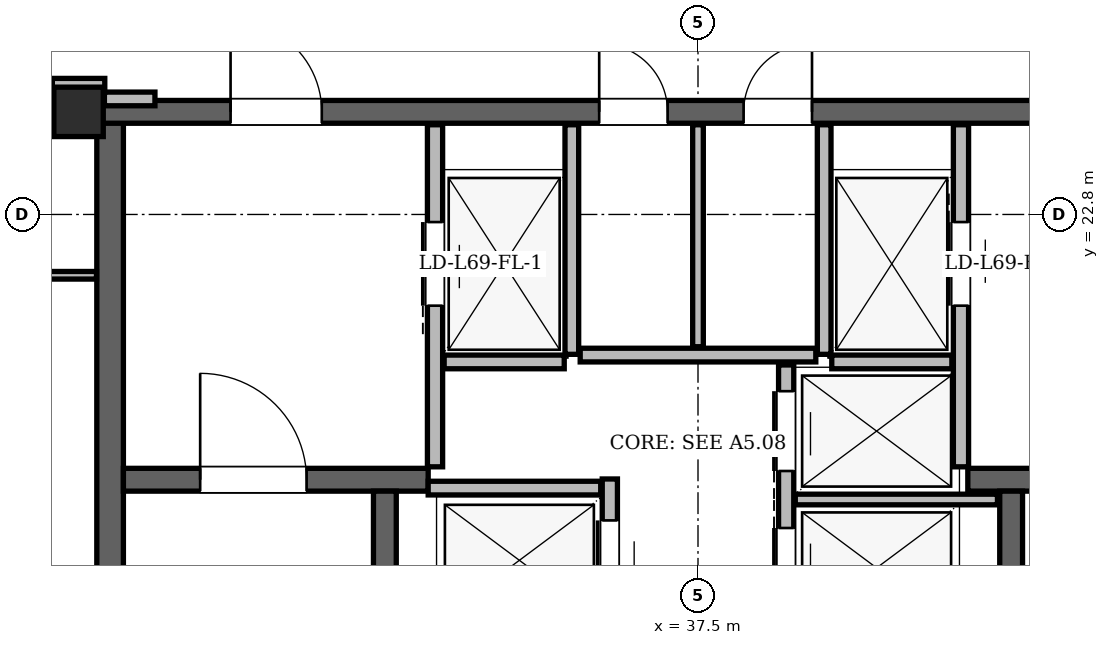
"""IFC4 building model, lengths in metres.
Left out: names, types, materials, properties, quantities, classifications, styles, units other than length and angle.
Written with IfcOpenShell. Run it as: python <this file> out.ifc"""

import sys

from ifc_helpers import new_model, si_unit, direction, frame, frame_2d, origin, origin_2d, place, context, subcontext, project, spatial, rectangle, hollow_rectangle, extrude, element, fill, save


model = new_model("IFC4")
c1 = context("Model", 3, precision=1e-05, world=origin(), true_north=direction((0.0, 1.0)))
c2 = subcontext(c1, "Body", "Model", "MODEL_VIEW")
j1 = project(units=[si_unit("LENGTHUNIT", "METRE"), si_unit("PLANEANGLEUNIT", "RADIAN")], contexts=[c1])
p1 = place(None, origin())
s1 = spatial("IfcSite", under=j1, at=p1, CompositionType="ELEMENT")
p2 = place(p1, origin())
s2 = spatial("IfcBuilding", under=s1, at=p2, CompositionType="ELEMENT")
p3 = place(p2, frame((0.0, 0.0, 261.6)))
s3 = spatial("IfcBuildingStorey", under=s2, at=p3, CompositionType="ELEMENT", Elevation=261.6)
p4 = place(p3, frame((29.35, 24.15, 0.0), z_axis=(0.0, 0.0, 1.0), x_axis=(1.0, 0.0, 0.0)))
e1 = element("IfcColumn", 1, at=p4, inside=s3, PredefinedType="COLUMN", context=c2, shape_type="SweptSolid", body=[
    extrude(hollow_rectangle(XDim=0.65, YDim=0.65, WallThickness=0.05, at=origin_2d()), origin(), (0.0, 0.0, 1.0), 3.9),
])
p5 = place(p3, frame((29.765, 11.0, 0.0), z_axis=(0.0, 0.0, 1.0), x_axis=(0.0, 1.0, 0.0)))
e2 = element("IfcWall", 2, at=p5, inside=s3, PredefinedType="SHEAR", context=c2, shape_type="SweptSolid", body=[
    extrude(rectangle(XDim=13.3, YDim=0.35, at=frame_2d((6.65, 0.0))), origin(), (0.0, 0.0, 1.0), 3.68),
])
p6 = place(p3, frame((29.65, 24.15, 0.0), z_axis=(0.0, 0.0, 1.0), x_axis=(1.0, 0.0, 0.0)))
e3 = element("IfcWall", 3, at=p6, inside=s3, PredefinedType="SHEAR", context=c2, shape_type="SweptSolid", body=[
    extrude(rectangle(XDim=15.7, YDim=0.3, at=frame_2d((7.85, 0.0))), origin(), (0.0, 0.0, 1.0), 3.68),
])
p7 = place(p6, frame((1.7, 0.0, 0.0)))
e4 = element("IfcOpeningElement", 4, at=p7, cuts=e3, PredefinedType="OPENING", context=c2, shape_type="SweptSolid", body=[
    extrude(rectangle(XDim=1.2, YDim=2.2, at=frame_2d((0.6, 1.1))), frame((0.0, 0.15, 0.0), z_axis=(0.0, -1.0, 0.0), x_axis=(1.0, 0.0, 0.0)), (0.0, 0.0, 1.0), 0.3),
])
p8 = place(p6, frame((12.8, 0.0, 0.0)))
e5 = element("IfcOpeningElement", 5, at=p8, cuts=e3, PredefinedType="OPENING", context=c2, shape_type="SweptSolid", body=[
    extrude(rectangle(XDim=1.2, YDim=2.2, at=frame_2d((0.6, 1.1))), frame((0.0, 0.15, 0.0), z_axis=(0.0, -1.0, 0.0), x_axis=(1.0, 0.0, 0.0)), (0.0, 0.0, 1.0), 0.3),
])
p9 = place(p6, frame((6.55, 0.0, 0.0)))
e6 = element("IfcOpeningElement", 6, at=p9, cuts=e3, PredefinedType="OPENING", context=c2, shape_type="SweptSolid", body=[
    extrude(rectangle(XDim=0.9, YDim=2.05, at=frame_2d((0.45, 1.025))), frame((0.0, 0.15, 0.0), z_axis=(0.0, -1.0, 0.0), x_axis=(1.0, 0.0, 0.0)), (0.0, 0.0, 1.0), 0.3),
])
p10 = place(p6, frame((8.45, 0.0, 0.0)))
e7 = element("IfcOpeningElement", 7, at=p10, cuts=e3, PredefinedType="OPENING", context=c2, shape_type="SweptSolid", body=[
    extrude(rectangle(XDim=0.9, YDim=2.05, at=frame_2d((0.45, 1.025))), frame((0.0, 0.15, 0.0), z_axis=(0.0, -1.0, 0.0), x_axis=(1.0, 0.0, 0.0)), (0.0, 0.0, 1.0), 0.3),
])
p11 = place(p3, frame((29.94, 19.31, 0.0), z_axis=(0.0, 0.0, 1.0), x_axis=(1.0, 0.0, 0.0)))
e8 = element("IfcWall", 8, at=p11, inside=s3, PredefinedType="SHEAR", context=c2, shape_type="SweptSolid", body=[
    extrude(rectangle(XDim=4.01, YDim=0.3, at=frame_2d((2.005, 0.0))), origin(), (0.0, 0.0, 1.0), 3.68),
])
p12 = place(p11, frame((1.01, 0.0, 0.0)))
e9 = element("IfcOpeningElement", 9, at=p12, cuts=e8, PredefinedType="OPENING", context=c2, shape_type="SweptSolid", body=[
    extrude(rectangle(XDim=1.4, YDim=2.2, at=frame_2d((0.7, 1.1))), frame((0.0, 0.15, 0.0), z_axis=(0.0, -1.0, 0.0), x_axis=(1.0, 0.0, 0.0)), (0.0, 0.0, 1.0), 0.3),
])
p13 = place(p3, frame((41.05, 19.31, 0.0), z_axis=(0.0, 0.0, 1.0), x_axis=(1.0, 0.0, 0.0)))
e10 = element("IfcWall", 10, at=p13, inside=s3, PredefinedType="SHEAR", context=c2, shape_type="SweptSolid", body=[
    extrude(rectangle(XDim=4.01, YDim=0.3, at=frame_2d((2.005, 0.0))), origin(), (0.0, 0.0, 1.0), 3.68),
])
p14 = place(p13, frame((1.6, 0.0, 0.0)))
e11 = element("IfcOpeningElement", 11, at=p14, cuts=e10, PredefinedType="OPENING", context=c2, shape_type="SweptSolid", body=[
    extrude(rectangle(XDim=1.4, YDim=2.2, at=frame_2d((0.7, 1.1))), frame((0.0, 0.15, 0.0), z_axis=(0.0, -1.0, 0.0), x_axis=(1.0, 0.0, 0.0)), (0.0, 0.0, 1.0), 0.3),
])
for number, where, z_axis, x_axis in (
    (12, (33.38, 11.54, 0.0), (0.0, 0.0, 1.0), (0.0, 1.0, 0.0)),
    (13, (41.62, 11.54, 0.0), (0.0, 0.0, 1.0), (0.0, 1.0, 0.0)),
):
    element("IfcWall", number, at=place(p3, frame(where, z_axis=z_axis, x_axis=x_axis)), inside=s3, PredefinedType="SHEAR", context=c2, shape_type="SweptSolid", body=[
        extrude(rectangle(XDim=7.62, YDim=0.3, at=frame_2d((3.81, 0.0))), origin(), (0.0, 0.0, 1.0), 3.68),
    ])
p15 = place(p3, frame((58.652, 10.835, 0.0), z_axis=(0.0, 0.0, 1.0), x_axis=(-0.500002906693, 0.866023725598, 0.0)))
e14 = element("IfcWall", 14, at=p15, inside=s3, PredefinedType="SOLIDWALL", context=c2, shape_type="SweptSolid", body=[
    extrude(rectangle(XDim=37.2, YDim=0.29, at=frame_2d((18.6, 0.0))), origin(), (0.0, 0.0, 1.0), 3.058),
])
p16 = place(p15, frame((6.774, 0.0, 0.0)))
e15 = element("IfcOpeningElement", 15, at=p16, cuts=e14, PredefinedType="OPENING", context=c2, shape_type="SweptSolid", body=[
    extrude(rectangle(XDim=1.5, YDim=2.2, at=frame_2d((0.75, 1.1))), frame((0.0, 0.145, 0.0), z_axis=(0.0, -1.0, 0.0), x_axis=(1.0, 0.0, 0.0)), (0.0, 0.0, 1.0), 0.29),
])
p17 = place(p15, frame((32.061, 0.0, 0.0)))
e16 = element("IfcOpeningElement", 16, at=p17, cuts=e14, PredefinedType="OPENING", context=c2, shape_type="SweptSolid", body=[
    extrude(rectangle(XDim=1.5, YDim=2.2, at=frame_2d((0.75, 1.1))), frame((0.0, 0.145, 0.0), z_axis=(0.0, -1.0, 0.0), x_axis=(1.0, 0.0, 0.0)), (0.0, 0.0, 1.0), 0.29),
])
p18 = place(p15, frame((12.689, 0.0, 0.85)))
e17 = element("IfcOpeningElement", 17, at=p18, cuts=e14, PredefinedType="OPENING", context=c2, shape_type="SweptSolid", body=[
    extrude(rectangle(XDim=1.6, YDim=1.7, at=frame_2d((0.8, 0.85))), frame((0.0, 0.145, 0.0), z_axis=(0.0, -1.0, 0.0), x_axis=(1.0, 0.0, 0.0)), (0.0, 0.0, 1.0), 0.29),
])
p19 = place(p15, frame((16.599, 0.0, 0.85)))
e18 = element("IfcOpeningElement", 18, at=p19, cuts=e14, PredefinedType="OPENING", context=c2, shape_type="SweptSolid", body=[
    extrude(rectangle(XDim=3.0, YDim=2.098, at=frame_2d((1.5, 1.049))), frame((0.0, 0.145, 0.0), z_axis=(0.0, -1.0, 0.0), x_axis=(1.0, 0.0, 0.0)), (0.0, 0.0, 1.0), 0.29),
])
p20 = place(p15, frame((1.24, 0.0, 0.85)))
e19 = element("IfcOpeningElement", 19, at=p20, cuts=e14, PredefinedType="OPENING", context=c2, shape_type="SweptSolid", body=[
    extrude(rectangle(XDim=1.2, YDim=1.48, at=frame_2d((0.6, 0.74))), frame((0.0, 0.145, 0.0), z_axis=(0.0, -1.0, 0.0), x_axis=(1.0, 0.0, 0.0)), (0.0, 0.0, 1.0), 0.29),
])
p21 = place(p15, frame((3.566, 0.0, 0.85)))
e20 = element("IfcOpeningElement", 20, at=p21, cuts=e14, PredefinedType="OPENING", context=c2, shape_type="SweptSolid", body=[
    extrude(rectangle(XDim=1.2, YDim=1.48, at=frame_2d((0.6, 0.74))), frame((0.0, 0.145, 0.0), z_axis=(0.0, -1.0, 0.0), x_axis=(1.0, 0.0, 0.0)), (0.0, 0.0, 1.0), 0.29),
])
p22 = place(p15, frame((22.917, 0.0, 0.85)))
e21 = element("IfcOpeningElement", 21, at=p22, cuts=e14, PredefinedType="OPENING", context=c2, shape_type="SweptSolid", body=[
    extrude(rectangle(XDim=1.6, YDim=1.7, at=frame_2d((0.8, 0.85))), frame((0.0, 0.145, 0.0), z_axis=(0.0, -1.0, 0.0), x_axis=(1.0, 0.0, 0.0)), (0.0, 0.0, 1.0), 0.29),
])
p23 = place(p15, frame((27.025, 0.0, 0.85)))
e22 = element("IfcOpeningElement", 22, at=p23, cuts=e14, PredefinedType="OPENING", context=c2, shape_type="SweptSolid", body=[
    extrude(rectangle(XDim=3.0, YDim=2.098, at=frame_2d((1.5, 1.049))), frame((0.0, 0.145, 0.0), z_axis=(0.0, -1.0, 0.0), x_axis=(1.0, 0.0, 0.0)), (0.0, 0.0, 1.0), 0.29),
])
p24 = place(p15, frame((34.508, 0.0, 0.85)))
e23 = element("IfcOpeningElement", 23, at=p24, cuts=e14, PredefinedType="OPENING", context=c2, shape_type="SweptSolid", body=[
    extrude(rectangle(XDim=1.2, YDim=1.48, at=frame_2d((0.6, 0.74))), frame((0.0, 0.145, 0.0), z_axis=(0.0, -1.0, 0.0), x_axis=(1.0, 0.0, 0.0)), (0.0, 0.0, 1.0), 0.29),
])
p25 = place(p3, frame((34.948, 43.051, 0.0), z_axis=(0.0, 0.0, 1.0), x_axis=(-0.500002906693, -0.866023725598, 0.0)))
e24 = element("IfcWall", 24, at=p25, inside=s3, PredefinedType="SOLIDWALL", context=c2, shape_type="SweptSolid", body=[
    extrude(rectangle(XDim=37.2, YDim=0.29, at=frame_2d((18.6, 0.0))), origin(), (0.0, 0.0, 1.0), 3.058),
])
p26 = place(p25, frame((8.034, 0.0, 0.0)))
e25 = element("IfcOpeningElement", 25, at=p26, cuts=e24, PredefinedType="OPENING", context=c2, shape_type="SweptSolid", body=[
    extrude(rectangle(XDim=1.5, YDim=2.2, at=frame_2d((0.75, 1.1))), frame((0.0, 0.145, 0.0), z_axis=(0.0, -1.0, 0.0), x_axis=(1.0, 0.0, 0.0)), (0.0, 0.0, 1.0), 0.29),
])
p27 = place(p25, frame((32.061, 0.0, 0.0)))
e26 = element("IfcOpeningElement", 26, at=p27, cuts=e24, PredefinedType="OPENING", context=c2, shape_type="SweptSolid", body=[
    extrude(rectangle(XDim=1.5, YDim=2.2, at=frame_2d((0.75, 1.1))), frame((0.0, 0.145, 0.0), z_axis=(0.0, -1.0, 0.0), x_axis=(1.0, 0.0, 0.0)), (0.0, 0.0, 1.0), 0.29),
])
p28 = place(p25, frame((35.104, 0.0, 0.85)))
e27 = element("IfcOpeningElement", 27, at=p28, cuts=e24, PredefinedType="OPENING", context=c2, shape_type="SweptSolid", body=[
    extrude(rectangle(XDim=1.2, YDim=1.48, at=frame_2d((0.6, 0.74))), frame((0.0, 0.145, 0.0), z_axis=(0.0, -1.0, 0.0), x_axis=(1.0, 0.0, 0.0)), (0.0, 0.0, 1.0), 0.29),
])
p29 = place(p25, frame((12.597, 0.0, 0.85)))
e28 = element("IfcOpeningElement", 28, at=p29, cuts=e24, PredefinedType="OPENING", context=c2, shape_type="SweptSolid", body=[
    extrude(rectangle(XDim=2.0, YDim=1.8, at=frame_2d((1.0, 0.9))), frame((0.0, 0.145, 0.0), z_axis=(0.0, -1.0, 0.0), x_axis=(1.0, 0.0, 0.0)), (0.0, 0.0, 1.0), 0.29),
])
p30 = place(p25, frame((20.995, 0.0, 0.85)))
e29 = element("IfcOpeningElement", 29, at=p30, cuts=e24, PredefinedType="OPENING", context=c2, shape_type="SweptSolid", body=[
    extrude(rectangle(XDim=1.4, YDim=1.6, at=frame_2d((0.7, 0.8))), frame((0.0, 0.145, 0.0), z_axis=(0.0, -1.0, 0.0), x_axis=(1.0, 0.0, 0.0)), (0.0, 0.0, 1.0), 0.29),
])
p31 = place(p25, frame((27.454, 0.0, 0.85)))
e30 = element("IfcOpeningElement", 30, at=p31, cuts=e24, PredefinedType="OPENING", context=c2, shape_type="SweptSolid", body=[
    extrude(rectangle(XDim=1.2, YDim=1.48, at=frame_2d((0.6, 0.74))), frame((0.0, 0.145, 0.0), z_axis=(0.0, -1.0, 0.0), x_axis=(1.0, 0.0, 0.0)), (0.0, 0.0, 1.0), 0.29),
])
p32 = place(p25, frame((2.415, 0.0, 0.85)))
e31 = element("IfcOpeningElement", 31, at=p32, cuts=e24, PredefinedType="OPENING", context=c2, shape_type="SweptSolid", body=[
    extrude(rectangle(XDim=2.6, YDim=1.95, at=frame_2d((1.3, 0.975))), frame((0.0, 0.145, 0.0), z_axis=(0.0, -1.0, 0.0), x_axis=(1.0, 0.0, 0.0)), (0.0, 0.0, 1.0), 0.29),
])
p33 = place(p3, frame((34.04, 19.48, 0.0), z_axis=(0.0, 0.0, 1.0), x_axis=(0.0, 1.0, 0.0)))
e32 = element("IfcWall", 32, at=p33, inside=s3, PredefinedType="PARTITIONING", context=c2, shape_type="SweptSolid", body=[
    extrude(rectangle(XDim=4.5, YDim=0.2, at=frame_2d((2.25, 0.0))), origin(), (0.0, 0.0, 1.0), 3.68),
])
p34 = place(p33, frame((2.12, 0.0, 0.0)))
e33 = element("IfcOpeningElement", 33, at=p34, cuts=e32, PredefinedType="OPENING", context=c2, shape_type="SweptSolid", body=[
    extrude(rectangle(XDim=1.1, YDim=2.2, at=frame_2d((0.55, 1.1))), frame((0.0, 0.1, 0.0), z_axis=(0.0, -1.0, 0.0), x_axis=(1.0, 0.0, 0.0)), (0.0, 0.0, 1.0), 0.2),
])
p35 = place(p3, frame((35.84, 20.96, 0.0), z_axis=(0.0, 0.0, 1.0), x_axis=(0.0, 1.0, 0.0)))
e34 = element("IfcWall", 34, at=p35, inside=s3, PredefinedType="PARTITIONING", context=c2, shape_type="SweptSolid", body=[
    extrude(rectangle(XDim=3.02, YDim=0.18, at=frame_2d((1.51, 0.0))), origin(), (0.0, 0.0, 1.0), 3.68),
])
p36 = place(p3, frame((34.16, 20.86, 0.0), z_axis=(0.0, 0.0, 1.0), x_axis=(1.0, 0.0, 0.0)))
e35 = element("IfcWall", 35, at=p36, inside=s3, PredefinedType="PARTITIONING", context=c2, shape_type="SweptSolid", body=[
    extrude(rectangle(XDim=1.58, YDim=0.18, at=frame_2d((0.79, 0.0))), origin(), (0.0, 0.0, 1.0), 3.68),
])
p37 = place(p3, frame((40.96, 19.48, 0.0), z_axis=(0.0, 0.0, 1.0), x_axis=(0.0, 1.0, 0.0)))
e36 = element("IfcWall", 36, at=p37, inside=s3, PredefinedType="PARTITIONING", context=c2, shape_type="SweptSolid", body=[
    extrude(rectangle(XDim=4.5, YDim=0.2, at=frame_2d((2.25, 0.0))), origin(), (0.0, 0.0, 1.0), 3.68),
])
p38 = place(p37, frame((2.12, 0.0, 0.0)))
e37 = element("IfcOpeningElement", 37, at=p38, cuts=e36, PredefinedType="OPENING", context=c2, shape_type="SweptSolid", body=[
    extrude(rectangle(XDim=1.1, YDim=2.2, at=frame_2d((0.55, 1.1))), frame((0.0, 0.1, 0.0), z_axis=(0.0, -1.0, 0.0), x_axis=(1.0, 0.0, 0.0)), (0.0, 0.0, 1.0), 0.2),
])
p39 = place(p3, frame((39.16, 20.96, 0.0), z_axis=(0.0, 0.0, 1.0), x_axis=(0.0, 1.0, 0.0)))
e38 = element("IfcWall", 38, at=p39, inside=s3, PredefinedType="PARTITIONING", context=c2, shape_type="SweptSolid", body=[
    extrude(rectangle(XDim=3.02, YDim=0.18, at=frame_2d((1.51, 0.0))), origin(), (0.0, 0.0, 1.0), 3.68),
])
p40 = place(p3, frame((39.26, 20.86, 0.0), z_axis=(0.0, 0.0, 1.0), x_axis=(1.0, 0.0, 0.0)))
e39 = element("IfcWall", 39, at=p40, inside=s3, PredefinedType="PARTITIONING", context=c2, shape_type="SweptSolid", body=[
    extrude(rectangle(XDim=1.58, YDim=0.18, at=frame_2d((0.79, 0.0))), origin(), (0.0, 0.0, 1.0), 3.68),
])
p41 = place(p3, frame((36.34, 17.25, 0.0), z_axis=(0.0, 0.0, 1.0), x_axis=(0.0, 1.0, 0.0)))
e40 = element("IfcWall", 40, at=p41, inside=s3, PredefinedType="PARTITIONING", context=c2, shape_type="SweptSolid", body=[
    extrude(rectangle(XDim=2.07, YDim=0.2, at=frame_2d((1.035, 0.0))), origin(), (0.0, 0.0, 1.0), 3.68),
])
p42 = place(p41, frame((0.475, 0.0, 0.0)))
e41 = element("IfcOpeningElement", 41, at=p42, cuts=e40, PredefinedType="OPENING", context=c2, shape_type="SweptSolid", body=[
    extrude(rectangle(XDim=1.05, YDim=2.15, at=frame_2d((0.525, 1.075))), frame((0.0, 0.1, 0.0), z_axis=(0.0, -1.0, 0.0), x_axis=(1.0, 0.0, 0.0)), (0.0, 0.0, 1.0), 0.2),
])
p43 = place(p3, frame((33.95, 19.2, 0.0), z_axis=(0.0, 0.0, 1.0), x_axis=(1.0, 0.0, 0.0)))
e42 = element("IfcWall", 42, at=p43, inside=s3, PredefinedType="PARTITIONING", context=c2, shape_type="SweptSolid", body=[
    extrude(rectangle(XDim=2.27, YDim=0.18, at=frame_2d((1.135, 0.0))), origin(), (0.0, 0.0, 1.0), 3.68),
])
p44 = place(p3, frame((38.66, 17.2, 0.0), z_axis=(0.0, 0.0, 1.0), x_axis=(0.0, 1.0, 0.0)))
e43 = element("IfcWall", 43, at=p44, inside=s3, PredefinedType="PARTITIONING", context=c2, shape_type="SweptSolid", body=[
    extrude(rectangle(XDim=3.62, YDim=0.2, at=frame_2d((1.81, 0.0))), origin(), (0.0, 0.0, 1.0), 3.68),
])
p45 = place(p44, frame((0.425, 0.0, 0.0)))
e44 = element("IfcOpeningElement", 44, at=p45, cuts=e43, PredefinedType="OPENING", context=c2, shape_type="SweptSolid", body=[
    extrude(rectangle(XDim=1.05, YDim=2.15, at=frame_2d((0.525, 1.075))), frame((0.0, 0.1, 0.0), z_axis=(0.0, -1.0, 0.0), x_axis=(1.0, 0.0, 0.0)), (0.0, 0.0, 1.0), 0.2),
])
p46 = place(p44, frame((2.225, 0.0, 0.0)))
e45 = element("IfcOpeningElement", 45, at=p46, cuts=e43, PredefinedType="OPENING", context=c2, shape_type="SweptSolid", body=[
    extrude(rectangle(XDim=1.05, YDim=2.15, at=frame_2d((0.525, 1.075))), frame((0.0, 0.1, 0.0), z_axis=(0.0, -1.0, 0.0), x_axis=(1.0, 0.0, 0.0)), (0.0, 0.0, 1.0), 0.2),
])
p47 = place(p3, frame((38.78, 19.05, 0.0), z_axis=(0.0, 0.0, 1.0), x_axis=(1.0, 0.0, 0.0)))
e46 = element("IfcWall", 46, at=p47, inside=s3, PredefinedType="PARTITIONING", context=c2, shape_type="SweptSolid", body=[
    extrude(rectangle(XDim=2.66, YDim=0.14, at=frame_2d((1.33, 0.0))), origin(), (0.0, 0.0, 1.0), 3.68),
])
p48 = place(p3, frame((35.95, 20.95, 0.0), z_axis=(0.0, 0.0, 1.0), x_axis=(1.0, 0.0, 0.0)))
e47 = element("IfcWall", 47, at=p48, inside=s3, PredefinedType="PARTITIONING", context=c2, shape_type="SweptSolid", body=[
    extrude(rectangle(XDim=3.1, YDim=0.18, at=frame_2d((1.55, 0.0))), origin(), (0.0, 0.0, 1.0), 3.68),
])
p49 = place(p3, frame((37.5, 21.06, 0.0), z_axis=(0.0, 0.0, 1.0), x_axis=(0.0, 1.0, 0.0)))
e48 = element("IfcWall", 48, at=p49, inside=s3, PredefinedType="PARTITIONING", context=c2, shape_type="SweptSolid", body=[
    extrude(rectangle(XDim=2.92, YDim=0.14, at=frame_2d((1.46, 0.0))), origin(), (0.0, 0.0, 1.0), 3.68),
])
p50 = place(p3, frame((22.966, 22.0, 0.0), z_axis=(0.0, 0.0, 1.0), x_axis=(1.0, 0.0, 0.0)))
e49 = element("IfcWall", 49, at=p50, inside=s3, PredefinedType="PARTITIONING", context=c2, shape_type="SweptSolid", body=[
    extrude(rectangle(XDim=6.62, YDim=0.1, at=frame_2d((3.31, 0.0))), origin(), (0.0, 0.0, 1.0), 2.82),
])
p51 = place(p50, frame((0.491, 0.0, 0.0)))
e50 = element("IfcOpeningElement", 50, at=p51, cuts=e49, PredefinedType="OPENING", context=c2, shape_type="SweptSolid", body=[
    extrude(rectangle(XDim=0.88, YDim=2.08, at=frame_2d((0.44, 1.04))), frame((0.0, 0.05, 0.0), z_axis=(0.0, -1.0, 0.0), x_axis=(1.0, 0.0, 0.0)), (0.0, 0.0, 1.0), 0.1),
])
p52 = place(p50, frame((2.441, 0.0, 0.0)))
e51 = element("IfcOpeningElement", 51, at=p52, cuts=e49, PredefinedType="OPENING", context=c2, shape_type="SweptSolid", body=[
    extrude(rectangle(XDim=0.95, YDim=2.1, at=frame_2d((0.475, 1.05))), frame((0.0, 0.05, 0.0), z_axis=(0.0, -1.0, 0.0), x_axis=(1.0, 0.0, 0.0)), (0.0, 0.0, 1.0), 0.1),
])
p53 = place(p50, frame((4.833, 0.0, 0.0)))
e52 = element("IfcOpeningElement", 52, at=p53, cuts=e49, PredefinedType="OPENING", context=c2, shape_type="SweptSolid", body=[
    extrude(rectangle(XDim=0.92, YDim=2.12, at=frame_2d((0.46, 1.06))), frame((0.0, 0.05, 0.0), z_axis=(0.0, -1.0, 0.0), x_axis=(1.0, 0.0, 0.0)), (0.0, 0.0, 1.0), 0.1),
])
p54 = place(p3, frame((25.6, 24.32, 0.0), z_axis=(0.0, 0.0, 1.0), x_axis=(1.0, 0.0, 0.0)))
e53 = element("IfcWall", 53, at=p54, inside=s3, PredefinedType="PARTITIONING", context=c2, shape_type="SweptSolid", body=[
    extrude(rectangle(XDim=3.41, YDim=0.18, at=frame_2d((1.705, 0.0))), origin(), (0.0, 0.0, 1.0), 3.68),
])
p55 = place(p3, frame((29.69, 24.32, 0.0), z_axis=(0.0, 0.0, 1.0), x_axis=(1.0, 0.0, 0.0)))
e54 = element("IfcWall", 54, at=p55, inside=s3, PredefinedType="PARTITIONING", context=c2, shape_type="SweptSolid", body=[
    extrude(rectangle(XDim=0.665, YDim=0.18, at=frame_2d((0.333, 0.0))), origin(), (0.0, 0.0, 1.0), 2.82),
])
p56 = place(p3, frame((29.005, 24.5, 0.0), z_axis=(0.0, 0.0, 1.0), x_axis=(1.0, 0.0, 0.0)))
e55 = element("IfcWall", 55, at=p56, inside=s3, PredefinedType="PARTITIONING", context=c2, shape_type="SweptSolid", body=[
    extrude(rectangle(XDim=0.69, YDim=0.18, at=frame_2d((0.345, 0.0))), origin(), (0.0, 0.0, 1.0), 3.266),
])
p57 = place(p34, origin())
e56 = element("IfcDoor", 56, at=p57, inside=s3, OperationType="SLIDING_TO_LEFT", PredefinedType="DOOR", context=c2, shape_type="SweptSolid", body=[
    extrude(rectangle(XDim=1.1, YDim=2.2, at=frame_2d((0.55, 1.1))), frame((0.0, 0.025, 0.0), z_axis=(0.0, -1.0, 0.0), x_axis=(1.0, 0.0, 0.0)), (0.0, 0.0, 1.0), 0.05),
])
fill(e33, e56)
p58 = place(p38, origin())
e57 = element("IfcDoor", 57, at=p58, inside=s3, OperationType="SLIDING_TO_RIGHT", PredefinedType="DOOR", context=c2, shape_type="SweptSolid", body=[
    extrude(rectangle(XDim=1.1, YDim=2.2, at=frame_2d((0.55, 1.1))), frame((0.0, 0.025, 0.0), z_axis=(0.0, -1.0, 0.0), x_axis=(1.0, 0.0, 0.0)), (0.0, 0.0, 1.0), 0.05),
])
fill(e37, e57)
p59 = place(p42, origin())
e58 = element("IfcDoor", 58, at=p59, inside=s3, OperationType="SLIDING_TO_LEFT", PredefinedType="DOOR", context=c2, shape_type="SweptSolid", body=[
    extrude(rectangle(XDim=1.05, YDim=2.15, at=frame_2d((0.525, 1.075))), frame((0.0, 0.025, 0.0), z_axis=(0.0, -1.0, 0.0), x_axis=(1.0, 0.0, 0.0)), (0.0, 0.0, 1.0), 0.05),
])
fill(e41, e58)
p60 = place(p45, origin())
e59 = element("IfcDoor", 59, at=p60, inside=s3, OperationType="SLIDING_TO_RIGHT", PredefinedType="DOOR", context=c2, shape_type="SweptSolid", body=[
    extrude(rectangle(XDim=1.05, YDim=2.15, at=frame_2d((0.525, 1.075))), frame((0.0, 0.025, 0.0), z_axis=(0.0, -1.0, 0.0), x_axis=(1.0, 0.0, 0.0)), (0.0, 0.0, 1.0), 0.05),
])
fill(e44, e59)
p61 = place(p46, origin())
e60 = element("IfcDoor", 60, at=p61, inside=s3, OperationType="SLIDING_TO_LEFT", PredefinedType="DOOR", context=c2, shape_type="SweptSolid", body=[
    extrude(rectangle(XDim=1.05, YDim=2.15, at=frame_2d((0.525, 1.075))), frame((0.0, 0.025, 0.0), z_axis=(0.0, -1.0, 0.0), x_axis=(1.0, 0.0, 0.0)), (0.0, 0.0, 1.0), 0.05),
])
fill(e45, e60)
p62 = place(p12, origin())
e61 = element("IfcDoor", 61, at=p62, inside=s3, OperationType="SINGLE_SWING_LEFT", PredefinedType="DOOR", context=c2, shape_type="SweptSolid", body=[
    extrude(rectangle(XDim=1.4, YDim=2.2, at=frame_2d((0.7, 1.1))), frame((0.0, 0.025, 0.0), z_axis=(0.0, -1.0, 0.0), x_axis=(1.0, 0.0, 0.0)), (0.0, 0.0, 1.0), 0.05),
])
fill(e9, e61)
p63 = place(p7, origin())
e62 = element("IfcDoor", 62, at=p63, inside=s3, OperationType="SINGLE_SWING_LEFT", PredefinedType="DOOR", context=c2, shape_type="SweptSolid", body=[
    extrude(rectangle(XDim=1.2, YDim=2.2, at=frame_2d((0.6, 1.1))), frame((0.0, 0.025, 0.0), z_axis=(0.0, -1.0, 0.0), x_axis=(1.0, 0.0, 0.0)), (0.0, 0.0, 1.0), 0.05),
])
fill(e4, e62)
p64 = place(p9, origin())
e63 = element("IfcDoor", 63, at=p64, inside=s3, OperationType="SINGLE_SWING_LEFT", PredefinedType="DOOR", context=c2, shape_type="SweptSolid", body=[
    extrude(rectangle(XDim=0.9, YDim=2.05, at=frame_2d((0.45, 1.025))), frame((0.0, 0.025, 0.0), z_axis=(0.0, -1.0, 0.0), x_axis=(1.0, 0.0, 0.0)), (0.0, 0.0, 1.0), 0.05),
])
fill(e6, e63)
p65 = place(p10, origin())
e64 = element("IfcDoor", 64, at=p65, inside=s3, OperationType="SINGLE_SWING_RIGHT", PredefinedType="DOOR", context=c2, shape_type="SweptSolid", body=[
    extrude(rectangle(XDim=0.9, YDim=2.05, at=frame_2d((0.45, 1.025))), frame((0.0, 0.025, 0.0), z_axis=(0.0, -1.0, 0.0), x_axis=(1.0, 0.0, 0.0)), (0.0, 0.0, 1.0), 0.05),
])
fill(e7, e64)
save(model, sys.argv[1])
